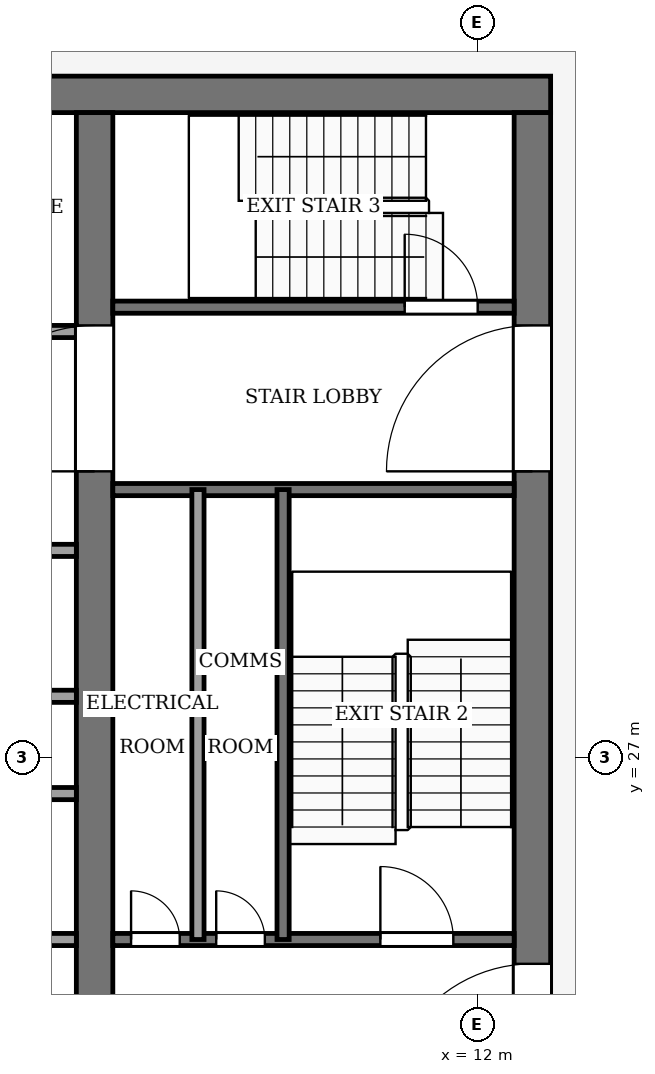
"""IFC4 building model, lengths in metres.
Left out: names, types, materials, properties, quantities, classifications, styles, units other than length and angle.
Written with IfcOpenShell. Run it as: python <this file> out.ifc"""

import sys

from ifc_helpers import new_model, si_unit, direction, frame, frame_2d, origin, place, context, subcontext, project, spatial, rectangle, extrude, element, fill, save


model = new_model("IFC4")
c1 = context("Model", 3, precision=1e-05, world=origin(), true_north=direction((0.0, 1.0)))
c2 = subcontext(c1, "Body", "Model", "MODEL_VIEW")
j1 = project(units=[si_unit("LENGTHUNIT", "METRE"), si_unit("PLANEANGLEUNIT", "RADIAN")], contexts=[c1])
p1 = place(None, origin())
s1 = spatial("IfcSite", under=j1, at=p1, CompositionType="ELEMENT")
p2 = place(p1, origin())
s2 = spatial("IfcBuilding", under=s1, at=p2, CompositionType="ELEMENT")
p3 = place(p2, frame((0.0, 0.0, 294.0)))
s3 = spatial("IfcBuildingStorey", under=s2, at=p3, CompositionType="ELEMENT", Elevation=294.0)
p4 = place(p3, frame((-13.2, 37.9, -0.13), z_axis=(0.0, 0.0, 1.0), x_axis=(1.0, 0.0, 0.0)))
e1 = element("IfcWall", 1, at=p4, inside=s3, PredefinedType="SHEAR", context=c2, shape_type="SweptSolid", body=[
    extrude(rectangle(XDim=26.4, YDim=0.6, at=frame_2d((13.2, 0.0))), origin(), (0.0, 0.0, 1.0), 4.0),
])
p5 = place(p3, frame((12.9, 18.4, -0.13), z_axis=(0.0, 0.0, 1.0), x_axis=(0.0, 1.0, 0.0)))
e2 = element("IfcWall", 2, at=p5, inside=s3, PredefinedType="SHEAR", context=c2, shape_type="SweptSolid", body=[
    extrude(rectangle(XDim=19.2, YDim=0.6, at=frame_2d((9.6, 0.0))), origin(), (0.0, 0.0, 1.0), 4.0),
])
p6 = place(p5, frame((2.8, 0.0, 0.13)))
e3 = element("IfcOpeningElement", 3, at=p6, cuts=e2, PredefinedType="OPENING", context=c2, shape_type="SweptSolid", body=[
    extrude(rectangle(XDim=2.4, YDim=2.4, at=frame_2d((1.2, 1.2))), frame((0.0, 0.31, 0.0), z_axis=(0.0, -1.0, 0.0), x_axis=(1.0, 0.0, 0.0)), (0.0, 0.0, 1.0), 0.62),
])
p7 = place(p5, frame((13.3, 0.0, 0.13)))
e4 = element("IfcOpeningElement", 4, at=p7, cuts=e2, PredefinedType="OPENING", context=c2, shape_type="SweptSolid", body=[
    extrude(rectangle(XDim=2.4, YDim=2.4, at=frame_2d((1.2, 1.2))), frame((0.0, 0.31, 0.0), z_axis=(0.0, -1.0, 0.0), x_axis=(1.0, 0.0, 0.0)), (0.0, 0.0, 1.0), 0.62),
])
p8 = place(p3, frame((5.7, 18.4, -0.13), z_axis=(0.0, 0.0, 1.0), x_axis=(0.0, 1.0, 0.0)))
e5 = element("IfcWall", 5, at=p8, inside=s3, PredefinedType="SHEAR", context=c2, shape_type="SweptSolid", body=[
    extrude(rectangle(XDim=19.2, YDim=0.6, at=frame_2d((9.6, 0.0))), origin(), (0.0, 0.0, 1.0), 4.0),
])
p9 = place(p8, frame((13.3, 0.0, 0.13)))
e6 = element("IfcOpeningElement", 6, at=p9, cuts=e5, PredefinedType="OPENING", context=c2, shape_type="SweptSolid", body=[
    extrude(rectangle(XDim=2.4, YDim=2.4, at=frame_2d((1.2, 1.2))), frame((0.0, 0.31, 0.0), z_axis=(0.0, -1.0, 0.0), x_axis=(1.0, 0.0, 0.0)), (0.0, 0.0, 1.0), 0.62),
])
p10 = place(p3, frame((-5.4, 24.0, 0.0), z_axis=(0.0, 0.0, 1.0), x_axis=(1.0, 0.0, 0.0)))
e7 = element("IfcWall", 7, at=p10, inside=s3, PredefinedType="PARTITIONING", context=c2, shape_type="SweptSolid", body=[
    extrude(rectangle(XDim=10.8, YDim=0.2, at=frame_2d((5.4, 0.0))), origin(), (0.0, 0.0, 1.0), 3.87),
])
p11 = place(p10, frame((2.632, 0.0, 0.0)))
e8 = element("IfcOpeningElement", 8, at=p11, cuts=e7, PredefinedType="OPENING", context=c2, shape_type="SweptSolid", body=[
    extrude(rectangle(XDim=1.0, YDim=2.1, at=frame_2d((0.5, 1.05))), frame((0.0, 0.11, 0.0), z_axis=(0.0, -1.0, 0.0), x_axis=(1.0, 0.0, 0.0)), (0.0, 0.0, 1.0), 0.22),
])
p12 = place(p10, frame((8.032, 0.0, 0.0)))
e9 = element("IfcOpeningElement", 9, at=p12, cuts=e7, PredefinedType="OPENING", context=c2, shape_type="SweptSolid", body=[
    extrude(rectangle(XDim=1.0, YDim=2.1, at=frame_2d((0.5, 1.05))), frame((0.0, 0.11, 0.0), z_axis=(0.0, -1.0, 0.0), x_axis=(1.0, 0.0, 0.0)), (0.0, 0.0, 1.0), 0.22),
])
p13 = place(p3, frame((6.0, 24.0, 0.0), z_axis=(0.0, 0.0, 1.0), x_axis=(1.0, 0.0, 0.0)))
e10 = element("IfcWall", 10, at=p13, inside=s3, PredefinedType="PARTITIONING", context=c2, shape_type="SweptSolid", body=[
    extrude(rectangle(XDim=6.6, YDim=0.2, at=frame_2d((3.3, 0.0))), origin(), (0.0, 0.0, 1.0), 3.87),
])
p14 = place(p13, frame((0.3, 0.0, 0.0)))
e11 = element("IfcOpeningElement", 11, at=p14, cuts=e10, PredefinedType="OPENING", context=c2, shape_type="SweptSolid", body=[
    extrude(rectangle(XDim=0.8, YDim=2.1, at=frame_2d((0.4, 1.05))), frame((0.0, 0.11, 0.0), z_axis=(0.0, -1.0, 0.0), x_axis=(1.0, 0.0, 0.0)), (0.0, 0.0, 1.0), 0.22),
])
p15 = place(p13, frame((1.7, 0.0, 0.0)))
e12 = element("IfcOpeningElement", 12, at=p15, cuts=e10, PredefinedType="OPENING", context=c2, shape_type="SweptSolid", body=[
    extrude(rectangle(XDim=0.8, YDim=2.1, at=frame_2d((0.4, 1.05))), frame((0.0, 0.11, 0.0), z_axis=(0.0, -1.0, 0.0), x_axis=(1.0, 0.0, 0.0)), (0.0, 0.0, 1.0), 0.22),
])
p16 = place(p13, frame((4.4, 0.0, 0.0)))
e13 = element("IfcOpeningElement", 13, at=p16, cuts=e10, PredefinedType="OPENING", context=c2, shape_type="SweptSolid", body=[
    extrude(rectangle(XDim=1.2, YDim=2.2, at=frame_2d((0.6, 1.1))), frame((0.0, 0.11, 0.0), z_axis=(0.0, -1.0, 0.0), x_axis=(1.0, 0.0, 0.0)), (0.0, 0.0, 1.0), 0.22),
])
for number, where, z_axis, x_axis in (
    (14, (-5.4, 26.4, 0.0), (0.0, 0.0, 1.0), (1.0, 0.0, 0.0)),
    (15, (-5.4, 28.0, 0.0), (0.0, 0.0, 1.0), (1.0, 0.0, 0.0)),
):
    element("IfcWall", number, at=place(p3, frame(where, z_axis=z_axis, x_axis=x_axis)), inside=s3, PredefinedType="PARTITIONING", context=c2, shape_type="SweptSolid", body=[
        extrude(rectangle(XDim=10.8, YDim=0.2, at=frame_2d((5.4, 0.0))), origin(), (0.0, 0.0, 1.0), 3.87),
    ])
p17 = place(p3, frame((-5.4, 30.4, 0.0), z_axis=(0.0, 0.0, 1.0), x_axis=(1.0, 0.0, 0.0)))
e16 = element("IfcWall", 16, at=p17, inside=s3, PredefinedType="PARTITIONING", context=c2, shape_type="SweptSolid", body=[
    extrude(rectangle(XDim=10.8, YDim=0.2, at=frame_2d((5.4, 0.0))), origin(), (0.0, 0.0, 1.0), 3.87),
])
p18 = place(p17, frame((2.848, 0.0, 0.0)))
e17 = element("IfcOpeningElement", 17, at=p18, cuts=e16, PredefinedType="OPENING", context=c2, shape_type="SweptSolid", body=[
    extrude(rectangle(XDim=1.0, YDim=2.1, at=frame_2d((0.5, 1.05))), frame((0.0, 0.11, 0.0), z_axis=(0.0, -1.0, 0.0), x_axis=(1.0, 0.0, 0.0)), (0.0, 0.0, 1.0), 0.22),
])
p19 = place(p17, frame((8.248, 0.0, 0.0)))
e18 = element("IfcOpeningElement", 18, at=p19, cuts=e16, PredefinedType="OPENING", context=c2, shape_type="SweptSolid", body=[
    extrude(rectangle(XDim=1.0, YDim=2.1, at=frame_2d((0.5, 1.05))), frame((0.0, 0.11, 0.0), z_axis=(0.0, -1.0, 0.0), x_axis=(1.0, 0.0, 0.0)), (0.0, 0.0, 1.0), 0.22),
])
p20 = place(p3, frame((6.0, 31.4, 0.0), z_axis=(0.0, 0.0, 1.0), x_axis=(1.0, 0.0, 0.0)))
e19 = element("IfcWall", 19, at=p20, inside=s3, PredefinedType="PARTITIONING", context=c2, shape_type="SweptSolid", body=[
    extrude(rectangle(XDim=6.6, YDim=0.2, at=frame_2d((3.3, 0.0))), origin(), (0.0, 0.0, 1.0), 3.87),
])
p21 = place(p3, frame((-5.4, 34.0, 0.0), z_axis=(0.0, 0.0, 1.0), x_axis=(1.0, 0.0, 0.0)))
e20 = element("IfcWall", 20, at=p21, inside=s3, PredefinedType="PARTITIONING", context=c2, shape_type="SweptSolid", body=[
    extrude(rectangle(XDim=10.8, YDim=0.2, at=frame_2d((5.4, 0.0))), origin(), (0.0, 0.0, 1.0), 3.87),
])
p22 = place(p21, frame((6.15, 0.0, 0.0)))
e21 = element("IfcOpeningElement", 21, at=p22, cuts=e20, PredefinedType="OPENING", context=c2, shape_type="SweptSolid", body=[
    extrude(rectangle(XDim=1.2, YDim=2.2, at=frame_2d((0.6, 1.1))), frame((0.0, 0.11, 0.0), z_axis=(0.0, -1.0, 0.0), x_axis=(1.0, 0.0, 0.0)), (0.0, 0.0, 1.0), 0.22),
])
p23 = place(p21, frame((8.95, 0.0, 0.0)))
e22 = element("IfcOpeningElement", 22, at=p23, cuts=e20, PredefinedType="OPENING", context=c2, shape_type="SweptSolid", body=[
    extrude(rectangle(XDim=1.0, YDim=2.1, at=frame_2d((0.5, 1.05))), frame((0.0, 0.11, 0.0), z_axis=(0.0, -1.0, 0.0), x_axis=(1.0, 0.0, 0.0)), (0.0, 0.0, 1.0), 0.22),
])
p24 = place(p3, frame((6.0, 34.4, 0.0), z_axis=(0.0, 0.0, 1.0), x_axis=(1.0, 0.0, 0.0)))
e23 = element("IfcWall", 23, at=p24, inside=s3, PredefinedType="PARTITIONING", context=c2, shape_type="SweptSolid", body=[
    extrude(rectangle(XDim=6.6, YDim=0.2, at=frame_2d((3.3, 0.0))), origin(), (0.0, 0.0, 1.0), 3.87),
])
p25 = place(p24, frame((4.8, 0.0, 0.0)))
e24 = element("IfcOpeningElement", 24, at=p25, cuts=e23, PredefinedType="OPENING", context=c2, shape_type="SweptSolid", body=[
    extrude(rectangle(XDim=1.2, YDim=2.2, at=frame_2d((0.6, 1.1))), frame((0.0, 0.11, 0.0), z_axis=(0.0, -1.0, 0.0), x_axis=(1.0, 0.0, 0.0)), (0.0, 0.0, 1.0), 0.22),
])
for number, where, z_axis, x_axis in (
    (25, (7.4, 24.0, 0.0), (0.0, 0.0, 1.0), (0.0, 1.0, 0.0)),
    (26, (8.8, 24.0, 0.0), (0.0, 0.0, 1.0), (0.0, 1.0, 0.0)),
):
    element("IfcWall", number, at=place(p3, frame(where, z_axis=z_axis, x_axis=x_axis)), inside=s3, PredefinedType="PARTITIONING", context=c2, shape_type="SweptSolid", body=[
        extrude(rectangle(XDim=7.4, YDim=0.2, at=frame_2d((3.7, 0.0))), origin(), (0.0, 0.0, 1.0), 3.87),
    ])
p26 = place(p14, origin())
e27 = element("IfcDoor", 27, at=p26, inside=s3, OperationType="SINGLE_SWING_RIGHT", PredefinedType="DOOR", context=c2, shape_type="SweptSolid", body=[
    extrude(rectangle(XDim=0.8, YDim=2.1, at=frame_2d((0.4, 1.05))), frame((0.0, 0.025, 0.0), z_axis=(0.0, -1.0, 0.0), x_axis=(1.0, 0.0, 0.0)), (0.0, 0.0, 1.0), 0.05),
])
fill(e11, e27)
p27 = place(p15, origin())
e28 = element("IfcDoor", 28, at=p27, inside=s3, OperationType="SINGLE_SWING_LEFT", PredefinedType="DOOR", context=c2, shape_type="SweptSolid", body=[
    extrude(rectangle(XDim=0.8, YDim=2.1, at=frame_2d((0.4, 1.05))), frame((0.0, 0.025, 0.0), z_axis=(0.0, -1.0, 0.0), x_axis=(1.0, 0.0, 0.0)), (0.0, 0.0, 1.0), 0.05),
])
fill(e12, e28)
p28 = place(p16, origin())
e29 = element("IfcDoor", 29, at=p28, inside=s3, OperationType="SINGLE_SWING_RIGHT", PredefinedType="DOOR", context=c2, shape_type="SweptSolid", body=[
    extrude(rectangle(XDim=1.2, YDim=2.2, at=frame_2d((0.6, 1.1))), frame((0.0, 0.025, 0.0), z_axis=(0.0, -1.0, 0.0), x_axis=(1.0, 0.0, 0.0)), (0.0, 0.0, 1.0), 0.05),
])
fill(e13, e29)
p29 = place(p25, origin())
e30 = element("IfcDoor", 30, at=p29, inside=s3, OperationType="SINGLE_SWING_LEFT", PredefinedType="DOOR", context=c2, shape_type="SweptSolid", body=[
    extrude(rectangle(XDim=1.2, YDim=2.2, at=frame_2d((0.6, 1.1))), frame((0.0, 0.025, 0.0), z_axis=(0.0, -1.0, 0.0), x_axis=(1.0, 0.0, 0.0)), (0.0, 0.0, 1.0), 0.05),
])
fill(e24, e30)
p30 = place(p9, origin())
e31 = element("IfcDoor", 31, at=p30, inside=s3, OperationType="DOUBLE_DOOR_SINGLE_SWING", PredefinedType="DOOR", context=c2, shape_type="SweptSolid", body=[
    extrude(rectangle(XDim=2.4, YDim=2.4, at=frame_2d((1.2, 1.2))), frame((0.0, 0.025, 0.0), z_axis=(0.0, -1.0, 0.0), x_axis=(1.0, 0.0, 0.0)), (0.0, 0.0, 1.0), 0.05),
])
fill(e6, e31)
p31 = place(p6, origin())
e32 = element("IfcDoor", 32, at=p31, inside=s3, OperationType="DOUBLE_DOOR_SINGLE_SWING", PredefinedType="DOOR", context=c2, shape_type="SweptSolid", body=[
    extrude(rectangle(XDim=2.4, YDim=2.4, at=frame_2d((1.2, 1.2))), frame((0.0, 0.025, 0.0), z_axis=(0.0, -1.0, 0.0), x_axis=(1.0, 0.0, 0.0)), (0.0, 0.0, 1.0), 0.05),
])
fill(e3, e32)
p32 = place(p7, origin())
e33 = element("IfcDoor", 33, at=p32, inside=s3, OperationType="DOUBLE_DOOR_SINGLE_SWING", PredefinedType="DOOR", context=c2, shape_type="SweptSolid", body=[
    extrude(rectangle(XDim=2.4, YDim=2.4, at=frame_2d((1.2, 1.2))), frame((0.0, 0.025, 0.0), z_axis=(0.0, -1.0, 0.0), x_axis=(1.0, 0.0, 0.0)), (0.0, 0.0, 1.0), 0.05),
])
fill(e4, e33)
save(model, sys.argv[1])
